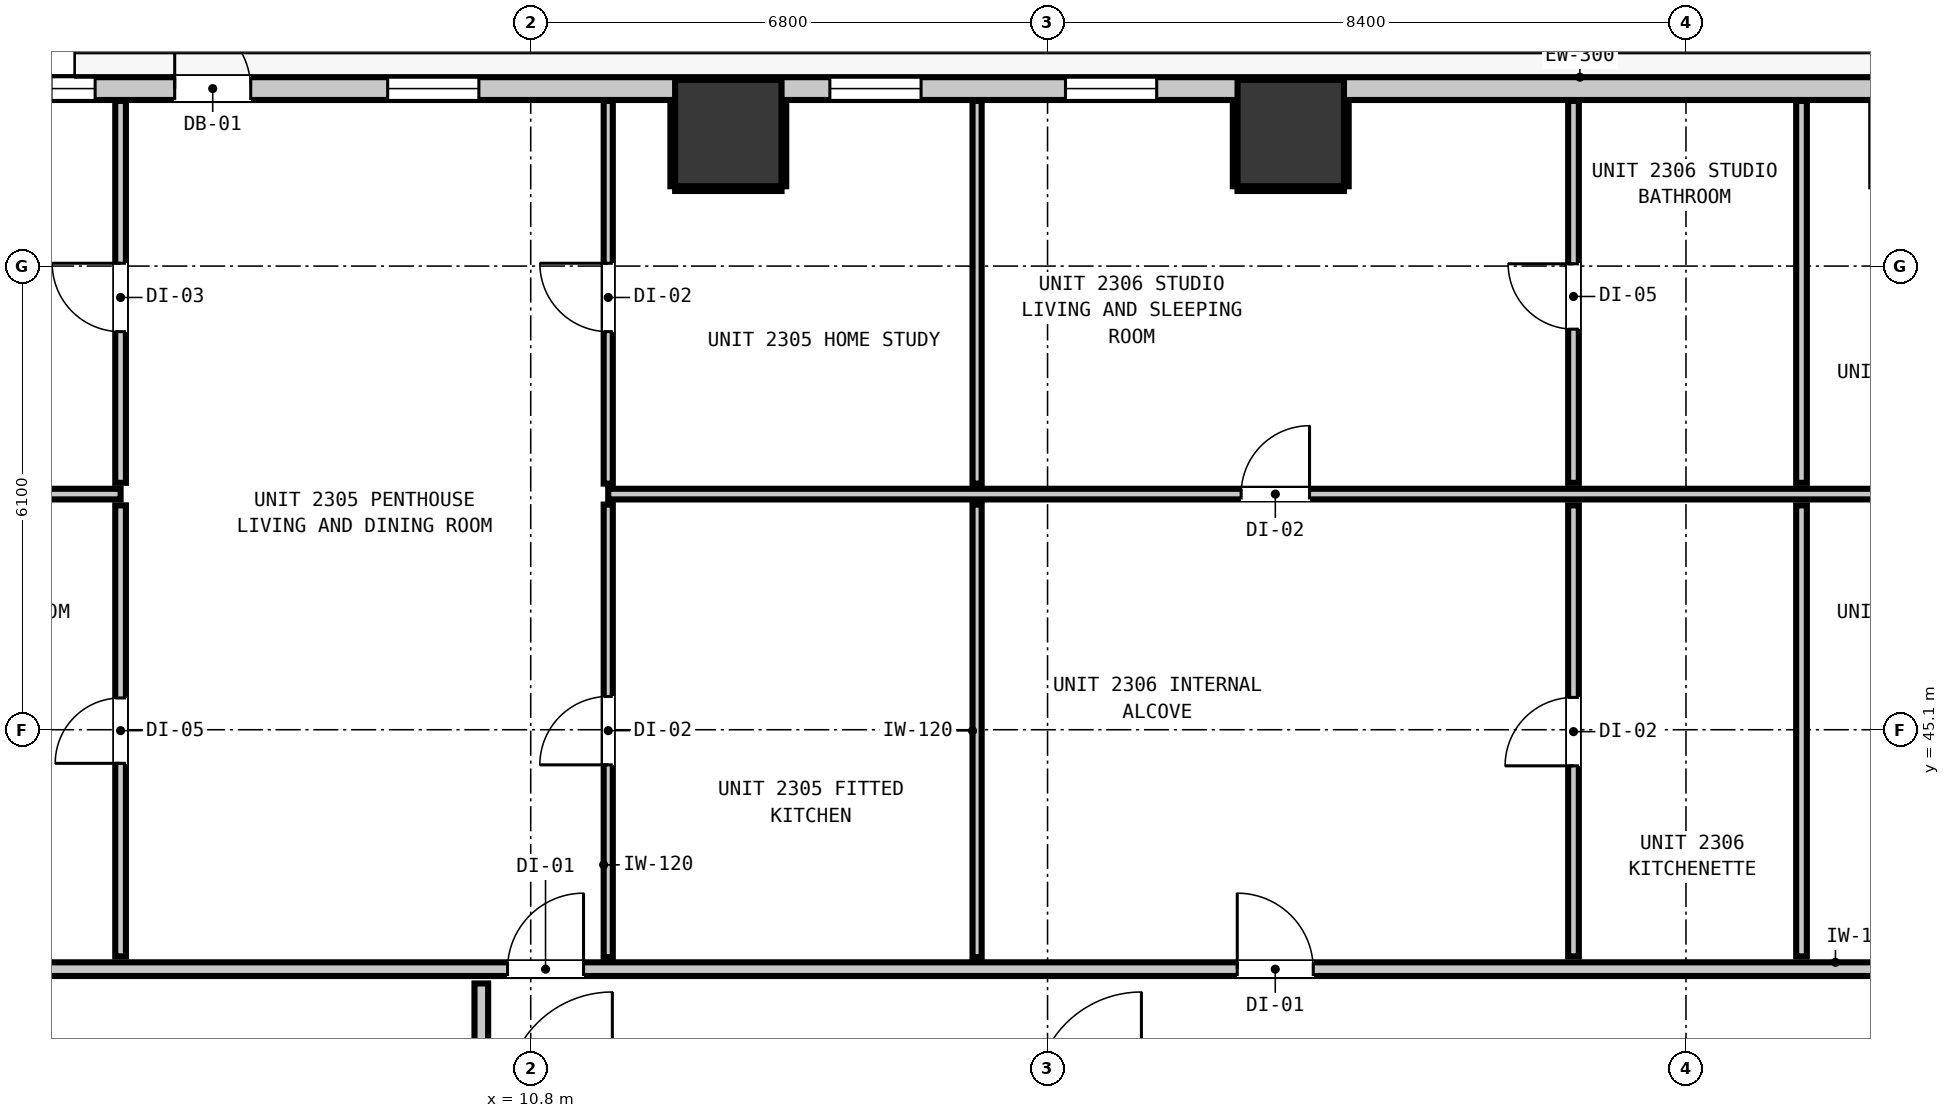
"""IFC4 building model, lengths in metres.
Left out: names, types, materials, properties, quantities, classifications, styles, units other than length and angle.
Written with IfcOpenShell. Run it as: python <this file> out.ifc"""

import sys

from ifc_helpers import new_model, si_unit, direction, frame, frame_2d, origin, origin_2d, place, context, subcontext, project, spatial, rectangle, extrude, element, fill, save


model = new_model("IFC4")
c1 = context("Model", 3, precision=1e-05, world=origin(), true_north=direction((0.0, 1.0)))
c2 = subcontext(c1, "Body", "Model", "MODEL_VIEW")
j1 = project(units=[si_unit("LENGTHUNIT", "METRE"), si_unit("PLANEANGLEUNIT", "RADIAN")], contexts=[c1])
p1 = place(None, origin())
s1 = spatial("IfcSite", under=j1, at=p1, CompositionType="ELEMENT")
p2 = place(p1, origin())
s2 = spatial("IfcBuilding", under=s1, at=p2, CompositionType="ELEMENT")
p3 = place(p2, frame((0.0, 0.0, 81.76)))
s3 = spatial("IfcBuildingStorey", under=s2, at=p3, CompositionType="ELEMENT", Elevation=81.76)
for number, where, z_axis, x_axis in (
    (1, (13.4, 52.95, -0.2), (0.0, 0.0, 1.0), (1.0, 0.0, 0.0)),
    (2, (20.8, 52.95, -0.2), (0.0, 0.0, 1.0), (1.0, 0.0, 0.0)),
):
    element("IfcColumn", number, at=place(p3, frame(where, z_axis=z_axis, x_axis=x_axis)), inside=s3, PredefinedType="COLUMN", context=c2, shape_type="SweptSolid", body=[
        extrude(rectangle(XDim=1.4, YDim=1.4, at=origin_2d()), origin(), (0.0, 0.0, 1.0), 3.52),
    ])
p4 = place(p3, frame((4.165, 53.535, 0.0), z_axis=(0.0, 0.0, 1.0), x_axis=(1.0, 0.0, 0.0)))
e3 = element("IfcWall", 3, at=p4, inside=s3, PredefinedType="STANDARD", context=c2, shape_type="SweptSolid", body=[
    extrude(rectangle(XDim=37.47, YDim=0.3, at=frame_2d((18.735, 0.0))), origin(), (0.0, 0.0, 1.0), 3.06),
])
p5 = place(p4, frame((1.951, 0.0, 0.0)))
e4 = element("IfcOpeningElement", 4, at=p5, cuts=e3, PredefinedType="OPENING", context=c2, shape_type="SweptSolid", body=[
    extrude(rectangle(XDim=1.0, YDim=2.15, at=frame_2d((0.5, 1.075))), frame((0.0, 0.16, 0.0), z_axis=(0.0, -1.0, 0.0), x_axis=(1.0, 0.0, 0.0)), (0.0, 0.0, 1.0), 0.32),
])
p6 = place(p4, frame((4.753, 0.0, 0.85)))
e5 = element("IfcOpeningElement", 5, at=p6, cuts=e3, PredefinedType="OPENING", context=c2, shape_type="SweptSolid", body=[
    extrude(rectangle(XDim=1.2, YDim=1.8, at=frame_2d((0.6, 0.9))), frame((0.0, 0.16, 0.0), z_axis=(0.0, -1.0, 0.0), x_axis=(1.0, 0.0, 0.0)), (0.0, 0.0, 1.0), 0.32),
])
p7 = place(p4, frame((0.324, 0.0, 0.85)))
e6 = element("IfcOpeningElement", 6, at=p7, cuts=e3, PredefinedType="OPENING", context=c2, shape_type="SweptSolid", body=[
    extrude(rectangle(XDim=0.58, YDim=1.5, at=frame_2d((0.29, 0.75))), frame((0.0, 0.16, 0.0), z_axis=(0.0, -1.0, 0.0), x_axis=(1.0, 0.0, 0.0)), (0.0, 0.0, 1.0), 0.32),
])
p8 = place(p4, frame((10.571, 0.0, 0.85)))
e7 = element("IfcOpeningElement", 7, at=p8, cuts=e3, PredefinedType="OPENING", context=c2, shape_type="SweptSolid", body=[
    extrude(rectangle(XDim=1.2, YDim=1.8, at=frame_2d((0.6, 0.9))), frame((0.0, 0.16, 0.0), z_axis=(0.0, -1.0, 0.0), x_axis=(1.0, 0.0, 0.0)), (0.0, 0.0, 1.0), 0.32),
])
p9 = place(p4, frame((13.671, 0.0, 0.85)))
e8 = element("IfcOpeningElement", 8, at=p9, cuts=e3, PredefinedType="OPENING", context=c2, shape_type="SweptSolid", body=[
    extrude(rectangle(XDim=1.2, YDim=1.8, at=frame_2d((0.6, 0.9))), frame((0.0, 0.16, 0.0), z_axis=(0.0, -1.0, 0.0), x_axis=(1.0, 0.0, 0.0)), (0.0, 0.0, 1.0), 0.32),
])
p10 = place(p4, frame((28.747, 0.0, 0.85)))
e9 = element("IfcOpeningElement", 9, at=p10, cuts=e3, PredefinedType="OPENING", context=c2, shape_type="SweptSolid", body=[
    extrude(rectangle(XDim=1.2, YDim=1.8, at=frame_2d((0.6, 0.9))), frame((0.0, 0.16, 0.0), z_axis=(0.0, -1.0, 0.0), x_axis=(1.0, 0.0, 0.0)), (0.0, 0.0, 1.0), 0.32),
])
p11 = place(p4, frame((26.007, 0.0, 0.85)))
e10 = element("IfcOpeningElement", 10, at=p11, cuts=e3, PredefinedType="OPENING", context=c2, shape_type="SweptSolid", body=[
    extrude(rectangle(XDim=0.58, YDim=1.5, at=frame_2d((0.29, 0.75))), frame((0.0, 0.16, 0.0), z_axis=(0.0, -1.0, 0.0), x_axis=(1.0, 0.0, 0.0)), (0.0, 0.0, 1.0), 0.32),
])
p12 = place(p4, frame((35.832, 0.0, 0.85)))
e11 = element("IfcOpeningElement", 11, at=p12, cuts=e3, PredefinedType="OPENING", context=c2, shape_type="SweptSolid", body=[
    extrude(rectangle(XDim=1.2, YDim=1.8, at=frame_2d((0.6, 0.9))), frame((0.0, 0.16, 0.0), z_axis=(0.0, -1.0, 0.0), x_axis=(1.0, 0.0, 0.0)), (0.0, 0.0, 1.0), 0.32),
])
p13 = place(p3, frame((1.827, 41.95, 0.0), z_axis=(0.0, 0.0, 1.0), x_axis=(1.0, 0.0, 0.0)))
e12 = element("IfcWall", 12, at=p13, inside=s3, PredefinedType="PARTITIONING", context=c2, shape_type="SweptSolid", body=[
    extrude(rectangle(XDim=42.146, YDim=0.18, at=frame_2d((21.073, 0.0))), origin(), (0.0, 0.0, 1.0), 3.06),
])
p14 = place(p13, frame((8.668, 0.0, 0.0)))
e13 = element("IfcOpeningElement", 13, at=p14, cuts=e12, PredefinedType="OPENING", context=c2, shape_type="SweptSolid", body=[
    extrude(rectangle(XDim=1.0, YDim=2.15, at=frame_2d((0.5, 1.075))), frame((0.0, 0.1, 0.0), z_axis=(0.0, -1.0, 0.0), x_axis=(1.0, 0.0, 0.0)), (0.0, 0.0, 1.0), 0.2),
])
p15 = place(p13, frame((18.269, 0.0, 0.0)))
e14 = element("IfcOpeningElement", 14, at=p15, cuts=e12, PredefinedType="OPENING", context=c2, shape_type="SweptSolid", body=[
    extrude(rectangle(XDim=1.0, YDim=2.15, at=frame_2d((0.5, 1.075))), frame((0.0, 0.1, 0.0), z_axis=(0.0, -1.0, 0.0), x_axis=(1.0, 0.0, 0.0)), (0.0, 0.0, 1.0), 0.2),
])
p16 = place(p13, frame((33.01, 0.0, 0.0)))
e15 = element("IfcOpeningElement", 15, at=p16, cuts=e12, PredefinedType="OPENING", context=c2, shape_type="SweptSolid", body=[
    extrude(rectangle(XDim=1.0, YDim=2.15, at=frame_2d((0.5, 1.075))), frame((0.0, 0.1, 0.0), z_axis=(0.0, -1.0, 0.0), x_axis=(1.0, 0.0, 0.0)), (0.0, 0.0, 1.0), 0.2),
])
p17 = place(p3, frame((1.827, 48.2, 0.0), z_axis=(0.0, 0.0, 1.0), x_axis=(1.0, 0.0, 0.0)))
e16 = element("IfcWall", 16, at=p17, inside=s3, PredefinedType="PARTITIONING", context=c2, shape_type="SweptSolid", body=[
    extrude(rectangle(XDim=3.577, YDim=0.14, at=frame_2d((1.789, 0.0))), origin(), (0.0, 0.0, 1.0), 3.06),
])
p18 = place(p3, frame((11.82, 48.2, 0.0), z_axis=(0.0, 0.0, 1.0), x_axis=(1.0, 0.0, 0.0)))
e17 = element("IfcWall", 17, at=p18, inside=s3, PredefinedType="PARTITIONING", context=c2, shape_type="SweptSolid", body=[
    extrude(rectangle(XDim=32.153, YDim=0.14, at=frame_2d((16.076, 0.0))), origin(), (0.0, 0.0, 1.0), 3.06),
])
p19 = place(p18, frame((8.327, 0.0, 0.0)))
e18 = element("IfcOpeningElement", 18, at=p19, cuts=e17, PredefinedType="OPENING", context=c2, shape_type="SweptSolid", body=[
    extrude(rectangle(XDim=0.9, YDim=2.1, at=frame_2d((0.45, 1.05))), frame((0.0, 0.08, 0.0), z_axis=(0.0, -1.0, 0.0), x_axis=(1.0, 0.0, 0.0)), (0.0, 0.0, 1.0), 0.16),
])
p20 = place(p18, frame((23.067, 0.0, 0.0)))
e19 = element("IfcOpeningElement", 19, at=p20, cuts=e17, PredefinedType="OPENING", context=c2, shape_type="SweptSolid", body=[
    extrude(rectangle(XDim=0.9, YDim=2.1, at=frame_2d((0.45, 1.05))), frame((0.0, 0.08, 0.0), z_axis=(0.0, -1.0, 0.0), x_axis=(1.0, 0.0, 0.0)), (0.0, 0.0, 1.0), 0.16),
])
p21 = place(p3, frame((10.15, 40.438, 0.0), z_axis=(0.0, 0.0, 1.0), x_axis=(0.0, 1.0, 0.0)))
e20 = element("IfcWall", 20, at=p21, inside=s3, PredefinedType="PARTITIONING", context=c2, shape_type="SweptSolid", body=[
    extrude(rectangle(XDim=1.324, YDim=0.18, at=frame_2d((0.662, 0.0))), origin(), (0.0, 0.0, 1.0), 3.06),
])
p22 = place(p3, frame((5.404, 42.118, 0.0), z_axis=(0.0, 0.0, 1.0), x_axis=(0.0, 1.0, 0.0)))
e21 = element("IfcWall", 21, at=p22, inside=s3, PredefinedType="PARTITIONING", context=c2, shape_type="SweptSolid", body=[
    extrude(rectangle(XDim=5.934, YDim=0.14, at=frame_2d((2.967, 0.0))), origin(), (0.0, 0.0, 1.0), 3.06),
])
p23 = place(p22, frame((2.54, 0.0, 0.0)))
e22 = element("IfcOpeningElement", 22, at=p23, cuts=e21, PredefinedType="OPENING", context=c2, shape_type="SweptSolid", body=[
    extrude(rectangle(XDim=0.86, YDim=2.02, at=frame_2d((0.43, 1.01))), frame((0.0, 0.08, 0.0), z_axis=(0.0, -1.0, 0.0), x_axis=(1.0, 0.0, 0.0)), (0.0, 0.0, 1.0), 0.16),
])
p24 = place(p3, frame((5.404, 48.348, 0.0), z_axis=(0.0, 0.0, 1.0), x_axis=(0.0, 1.0, 0.0)))
e23 = element("IfcWall", 23, at=p24, inside=s3, PredefinedType="PARTITIONING", context=c2, shape_type="SweptSolid", body=[
    extrude(rectangle(XDim=5.025, YDim=0.14, at=frame_2d((2.513, 0.0))), origin(), (0.0, 0.0, 1.0), 3.06),
])
p25 = place(p24, frame((1.989, 0.0, 0.0)))
e24 = element("IfcOpeningElement", 24, at=p25, cuts=e23, PredefinedType="OPENING", context=c2, shape_type="SweptSolid", body=[
    extrude(rectangle(XDim=0.9, YDim=2.1, at=frame_2d((0.45, 1.05))), frame((0.0, 0.08, 0.0), z_axis=(0.0, -1.0, 0.0), x_axis=(1.0, 0.0, 0.0)), (0.0, 0.0, 1.0), 0.16),
])
p26 = place(p3, frame((24.52, 42.118, 0.0), z_axis=(0.0, 0.0, 1.0), x_axis=(0.0, 1.0, 0.0)))
e25 = element("IfcWall", 25, at=p26, inside=s3, PredefinedType="PARTITIONING", context=c2, shape_type="SweptSolid", body=[
    extrude(rectangle(XDim=5.934, YDim=0.14, at=frame_2d((2.967, 0.0))), origin(), (0.0, 0.0, 1.0), 3.06),
])
p27 = place(p26, frame((2.507, 0.0, 0.0)))
e26 = element("IfcOpeningElement", 26, at=p27, cuts=e25, PredefinedType="OPENING", context=c2, shape_type="SweptSolid", body=[
    extrude(rectangle(XDim=0.9, YDim=2.1, at=frame_2d((0.45, 1.05))), frame((0.0, 0.08, 0.0), z_axis=(0.0, -1.0, 0.0), x_axis=(1.0, 0.0, 0.0)), (0.0, 0.0, 1.0), 0.16),
])
p28 = place(p3, frame((24.52, 48.348, 0.0), z_axis=(0.0, 0.0, 1.0), x_axis=(0.0, 1.0, 0.0)))
e27 = element("IfcWall", 27, at=p28, inside=s3, PredefinedType="PARTITIONING", context=c2, shape_type="SweptSolid", body=[
    extrude(rectangle(XDim=5.025, YDim=0.14, at=frame_2d((2.513, 0.0))), origin(), (0.0, 0.0, 1.0), 3.06),
])
p29 = place(p28, frame((2.022, 0.0, 0.0)))
e28 = element("IfcOpeningElement", 28, at=p29, cuts=e27, PredefinedType="OPENING", context=c2, shape_type="SweptSolid", body=[
    extrude(rectangle(XDim=0.86, YDim=2.02, at=frame_2d((0.43, 1.01))), frame((0.0, 0.08, 0.0), z_axis=(0.0, -1.0, 0.0), x_axis=(1.0, 0.0, 0.0)), (0.0, 0.0, 1.0), 0.16),
])
p30 = place(p3, frame((27.52, 42.118, 0.0), z_axis=(0.0, 0.0, 1.0), x_axis=(0.0, 1.0, 0.0)))
e29 = element("IfcWall", 29, at=p30, inside=s3, PredefinedType="PARTITIONING", context=c2, shape_type="SweptSolid", body=[
    extrude(rectangle(XDim=5.934, YDim=0.14, at=frame_2d((2.967, 0.0))), origin(), (0.0, 0.0, 1.0), 3.06),
])
p31 = place(p3, frame((27.52, 48.348, 0.0), z_axis=(0.0, 0.0, 1.0), x_axis=(0.0, 1.0, 0.0)))
e30 = element("IfcWall", 30, at=p31, inside=s3, PredefinedType="PARTITIONING", context=c2, shape_type="SweptSolid", body=[
    extrude(rectangle(XDim=5.025, YDim=0.14, at=frame_2d((2.513, 0.0))), origin(), (0.0, 0.0, 1.0), 3.06),
])
p32 = place(p3, frame((11.82, 42.108, 0.0), z_axis=(0.0, 0.0, 1.0), x_axis=(0.0, 1.0, 0.0)))
e31 = element("IfcWall", 31, at=p32, inside=s3, PredefinedType="PARTITIONING", context=c2, shape_type="SweptSolid", body=[
    extrude(rectangle(XDim=5.954, YDim=0.12, at=frame_2d((2.977, 0.0))), origin(), (0.0, 0.0, 1.0), 3.06),
])
p33 = place(p32, frame((2.53, 0.0, 0.0)))
e32 = element("IfcOpeningElement", 32, at=p33, cuts=e31, PredefinedType="OPENING", context=c2, shape_type="SweptSolid", body=[
    extrude(rectangle(XDim=0.9, YDim=2.1, at=frame_2d((0.45, 1.05))), frame((0.0, 0.07, 0.0), z_axis=(0.0, -1.0, 0.0), x_axis=(1.0, 0.0, 0.0)), (0.0, 0.0, 1.0), 0.14),
])
p34 = place(p3, frame((11.82, 48.338, 0.0), z_axis=(0.0, 0.0, 1.0), x_axis=(0.0, 1.0, 0.0)))
e33 = element("IfcWall", 33, at=p34, inside=s3, PredefinedType="PARTITIONING", context=c2, shape_type="SweptSolid", body=[
    extrude(rectangle(XDim=5.035, YDim=0.12, at=frame_2d((2.518, 0.0))), origin(), (0.0, 0.0, 1.0), 3.06),
])
p35 = place(p34, frame((1.999, 0.0, 0.0)))
e34 = element("IfcOpeningElement", 34, at=p35, cuts=e33, PredefinedType="OPENING", context=c2, shape_type="SweptSolid", body=[
    extrude(rectangle(XDim=0.9, YDim=2.1, at=frame_2d((0.45, 1.05))), frame((0.0, 0.07, 0.0), z_axis=(0.0, -1.0, 0.0), x_axis=(1.0, 0.0, 0.0)), (0.0, 0.0, 1.0), 0.14),
])
p36 = place(p3, frame((16.673, 42.108, 0.0), z_axis=(0.0, 0.0, 1.0), x_axis=(0.0, 1.0, 0.0)))
e35 = element("IfcWall", 35, at=p36, inside=s3, PredefinedType="PARTITIONING", context=c2, shape_type="SweptSolid", body=[
    extrude(rectangle(XDim=5.954, YDim=0.12, at=frame_2d((2.977, 0.0))), origin(), (0.0, 0.0, 1.0), 3.06),
])
p37 = place(p3, frame((16.673, 48.338, 0.0), z_axis=(0.0, 0.0, 1.0), x_axis=(0.0, 1.0, 0.0)))
e36 = element("IfcWall", 36, at=p37, inside=s3, PredefinedType="PARTITIONING", context=c2, shape_type="SweptSolid", body=[
    extrude(rectangle(XDim=5.035, YDim=0.12, at=frame_2d((2.518, 0.0))), origin(), (0.0, 0.0, 1.0), 3.06),
])
p38 = place(p3, frame((12.7, 52.218, 0.0), z_axis=(0.0, 0.0, 1.0), x_axis=(1.0, 0.0, 0.0)))
e37 = element("IfcWall", 37, at=p38, inside=s3, PredefinedType="PARTITIONING", context=c2, shape_type="SweptSolid", body=[
    extrude(rectangle(XDim=1.4, YDim=0.06, at=frame_2d((0.7, 0.0))), origin(), (0.0, 0.0, 1.0), 1.45),
])
for number, where, z_axis, x_axis in (
    (38, (12.668, 52.25, 0.0), (0.0, 0.0, 1.0), (0.0, 1.0, 0.0)),
    (39, (14.132, 52.25, 0.0), (0.0, 0.0, 1.0), (0.0, 1.0, 0.0)),
):
    element("IfcWall", number, at=place(p3, frame(where, z_axis=z_axis, x_axis=x_axis)), inside=s3, PredefinedType="PARTITIONING", context=c2, shape_type="SweptSolid", body=[
        extrude(rectangle(XDim=1.12, YDim=0.06, at=frame_2d((0.56, 0.0))), origin(), (0.0, 0.0, 1.0), 1.45),
    ])
p39 = place(p3, frame((20.1, 52.218, 0.0), z_axis=(0.0, 0.0, 1.0), x_axis=(1.0, 0.0, 0.0)))
e40 = element("IfcWall", 40, at=p39, inside=s3, PredefinedType="PARTITIONING", context=c2, shape_type="SweptSolid", body=[
    extrude(rectangle(XDim=1.4, YDim=0.06, at=frame_2d((0.7, 0.0))), origin(), (0.0, 0.0, 1.0), 1.45),
])
for number, where, z_axis, x_axis in (
    (41, (20.068, 52.25, 0.0), (0.0, 0.0, 1.0), (0.0, 1.0, 0.0)),
    (42, (21.532, 52.25, 0.0), (0.0, 0.0, 1.0), (0.0, 1.0, 0.0)),
):
    element("IfcWall", number, at=place(p3, frame(where, z_axis=z_axis, x_axis=x_axis)), inside=s3, PredefinedType="PARTITIONING", context=c2, shape_type="SweptSolid", body=[
        extrude(rectangle(XDim=1.12, YDim=0.06, at=frame_2d((0.56, 0.0))), origin(), (0.0, 0.0, 1.0), 1.45),
    ])
p40 = place(p5, origin())
e43 = element("IfcDoor", 43, at=p40, inside=s3, OperationType="SINGLE_SWING_LEFT", PredefinedType="DOOR", context=c2, shape_type="SweptSolid", body=[
    extrude(rectangle(XDim=1.0, YDim=2.15, at=frame_2d((0.5, 1.075))), frame((0.0, 0.025, 0.0), z_axis=(0.0, -1.0, 0.0), x_axis=(1.0, 0.0, 0.0)), (0.0, 0.0, 1.0), 0.05),
])
fill(e4, e43)
p41 = place(p6, origin())
e44 = element("IfcWindow", 44, at=p41, inside=s3, PartitioningType="SINGLE_PANEL", PredefinedType="WINDOW", context=c2, shape_type="SweptSolid", body=[
    extrude(rectangle(XDim=1.2, YDim=1.8, at=frame_2d((0.6, 0.9))), frame((0.0, 0.03, 0.0), z_axis=(0.0, -1.0, 0.0), x_axis=(1.0, 0.0, 0.0)), (0.0, 0.0, 1.0), 0.06),
])
fill(e5, e44)
p42 = place(p7, origin())
e45 = element("IfcWindow", 45, at=p42, inside=s3, PartitioningType="SINGLE_PANEL", PredefinedType="WINDOW", context=c2, shape_type="SweptSolid", body=[
    extrude(rectangle(XDim=0.58, YDim=1.5, at=frame_2d((0.29, 0.75))), frame((0.0, 0.03, 0.0), z_axis=(0.0, -1.0, 0.0), x_axis=(1.0, 0.0, 0.0)), (0.0, 0.0, 1.0), 0.06),
])
fill(e6, e45)
p43 = place(p8, origin())
e46 = element("IfcWindow", 46, at=p43, inside=s3, PartitioningType="SINGLE_PANEL", PredefinedType="WINDOW", context=c2, shape_type="SweptSolid", body=[
    extrude(rectangle(XDim=1.2, YDim=1.8, at=frame_2d((0.6, 0.9))), frame((0.0, 0.03, 0.0), z_axis=(0.0, -1.0, 0.0), x_axis=(1.0, 0.0, 0.0)), (0.0, 0.0, 1.0), 0.06),
])
fill(e7, e46)
p44 = place(p9, origin())
e47 = element("IfcWindow", 47, at=p44, inside=s3, PartitioningType="SINGLE_PANEL", PredefinedType="WINDOW", context=c2, shape_type="SweptSolid", body=[
    extrude(rectangle(XDim=1.2, YDim=1.8, at=frame_2d((0.6, 0.9))), frame((0.0, 0.03, 0.0), z_axis=(0.0, -1.0, 0.0), x_axis=(1.0, 0.0, 0.0)), (0.0, 0.0, 1.0), 0.06),
])
fill(e8, e47)
p45 = place(p14, origin())
e48 = element("IfcDoor", 48, at=p45, inside=s3, OperationType="SINGLE_SWING_RIGHT", PredefinedType="DOOR", context=c2, shape_type="SweptSolid", body=[
    extrude(rectangle(XDim=1.0, YDim=2.15, at=frame_2d((0.5, 1.075))), frame((0.0, 0.025, 0.0), z_axis=(0.0, -1.0, 0.0), x_axis=(1.0, 0.0, 0.0)), (0.0, 0.0, 1.0), 0.05),
])
fill(e13, e48)
p46 = place(p23, origin())
e49 = element("IfcDoor", 49, at=p46, inside=s3, OperationType="SINGLE_SWING_LEFT", PredefinedType="DOOR", context=c2, shape_type="SweptSolid", body=[
    extrude(rectangle(XDim=0.86, YDim=2.02, at=frame_2d((0.43, 1.01))), frame((0.0, 0.025, 0.0), z_axis=(0.0, -1.0, 0.0), x_axis=(1.0, 0.0, 0.0)), (0.0, 0.0, 1.0), 0.05),
])
fill(e22, e49)
p47 = place(p25, origin())
e50 = element("IfcDoor", 50, at=p47, inside=s3, OperationType="SINGLE_SWING_RIGHT", PredefinedType="DOOR", context=c2, shape_type="SweptSolid", body=[
    extrude(rectangle(XDim=0.9, YDim=2.1, at=frame_2d((0.45, 1.05))), frame((0.0, 0.025, 0.0), z_axis=(0.0, -1.0, 0.0), x_axis=(1.0, 0.0, 0.0)), (0.0, 0.0, 1.0), 0.05),
])
fill(e24, e50)
p48 = place(p33, origin())
e51 = element("IfcDoor", 51, at=p48, inside=s3, OperationType="SINGLE_SWING_LEFT", PredefinedType="DOOR", context=c2, shape_type="SweptSolid", body=[
    extrude(rectangle(XDim=0.9, YDim=2.1, at=frame_2d((0.45, 1.05))), frame((0.0, 0.025, 0.0), z_axis=(0.0, -1.0, 0.0), x_axis=(1.0, 0.0, 0.0)), (0.0, 0.0, 1.0), 0.05),
])
fill(e32, e51)
p49 = place(p35, origin())
e52 = element("IfcDoor", 52, at=p49, inside=s3, OperationType="SINGLE_SWING_RIGHT", PredefinedType="DOOR", context=c2, shape_type="SweptSolid", body=[
    extrude(rectangle(XDim=0.9, YDim=2.1, at=frame_2d((0.45, 1.05))), frame((0.0, 0.025, 0.0), z_axis=(0.0, -1.0, 0.0), x_axis=(1.0, 0.0, 0.0)), (0.0, 0.0, 1.0), 0.05),
])
fill(e34, e52)
p50 = place(p15, origin())
e53 = element("IfcDoor", 53, at=p50, inside=s3, OperationType="SINGLE_SWING_LEFT", PredefinedType="DOOR", context=c2, shape_type="SweptSolid", body=[
    extrude(rectangle(XDim=1.0, YDim=2.15, at=frame_2d((0.5, 1.075))), frame((0.0, 0.025, 0.0), z_axis=(0.0, -1.0, 0.0), x_axis=(1.0, 0.0, 0.0)), (0.0, 0.0, 1.0), 0.05),
])
fill(e14, e53)
p51 = place(p19, origin())
e54 = element("IfcDoor", 54, at=p51, inside=s3, OperationType="SINGLE_SWING_RIGHT", PredefinedType="DOOR", context=c2, shape_type="SweptSolid", body=[
    extrude(rectangle(XDim=0.9, YDim=2.1, at=frame_2d((0.45, 1.05))), frame((0.0, 0.025, 0.0), z_axis=(0.0, -1.0, 0.0), x_axis=(1.0, 0.0, 0.0)), (0.0, 0.0, 1.0), 0.05),
])
fill(e18, e54)
p52 = place(p27, origin())
e55 = element("IfcDoor", 55, at=p52, inside=s3, OperationType="SINGLE_SWING_LEFT", PredefinedType="DOOR", context=c2, shape_type="SweptSolid", body=[
    extrude(rectangle(XDim=0.9, YDim=2.1, at=frame_2d((0.45, 1.05))), frame((0.0, 0.025, 0.0), z_axis=(0.0, -1.0, 0.0), x_axis=(1.0, 0.0, 0.0)), (0.0, 0.0, 1.0), 0.05),
])
fill(e26, e55)
p53 = place(p29, origin())
e56 = element("IfcDoor", 56, at=p53, inside=s3, OperationType="SINGLE_SWING_RIGHT", PredefinedType="DOOR", context=c2, shape_type="SweptSolid", body=[
    extrude(rectangle(XDim=0.86, YDim=2.02, at=frame_2d((0.43, 1.01))), frame((0.0, 0.025, 0.0), z_axis=(0.0, -1.0, 0.0), x_axis=(1.0, 0.0, 0.0)), (0.0, 0.0, 1.0), 0.05),
])
fill(e28, e56)
save(model, sys.argv[1])
